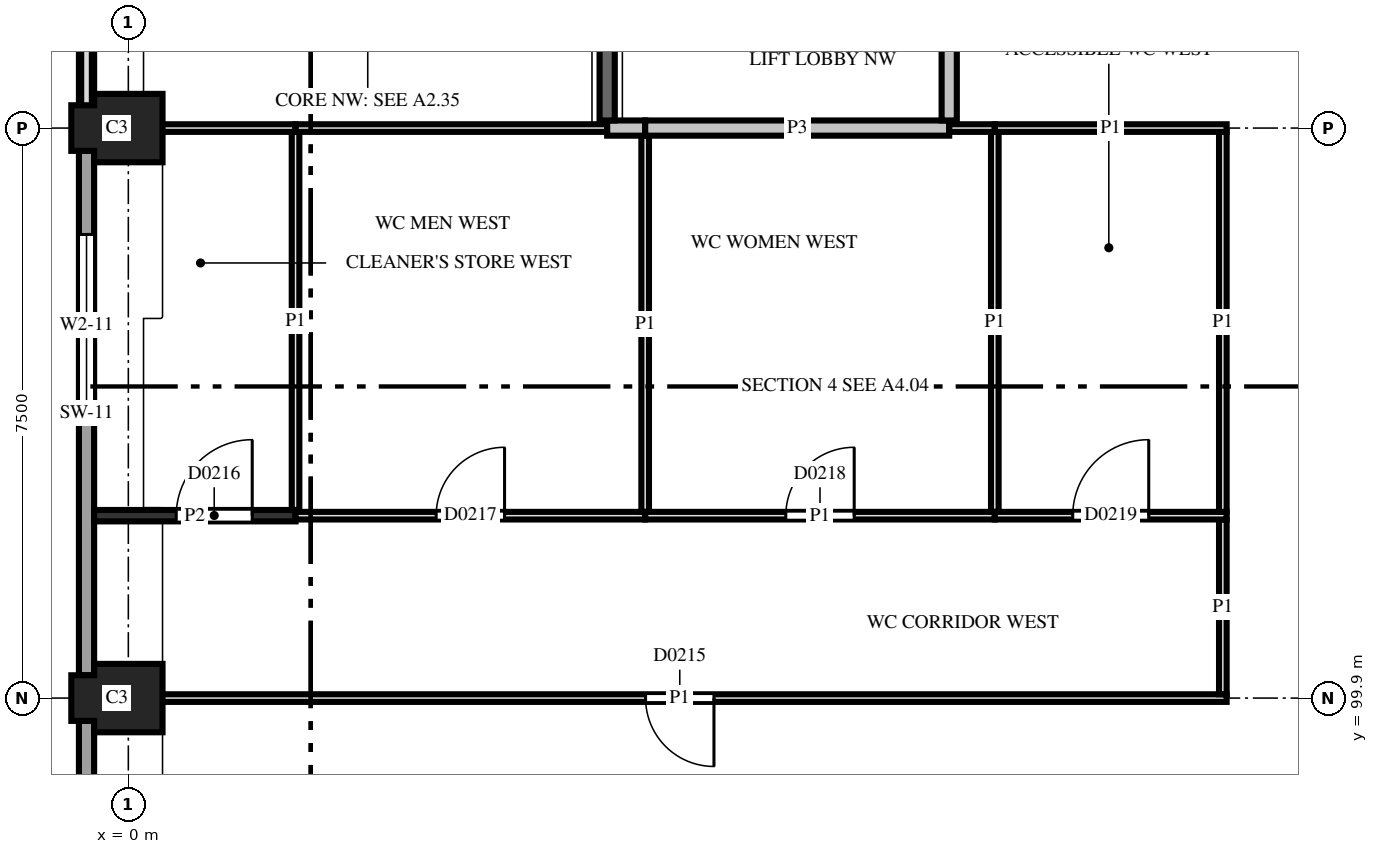
"""IFC4 building model, lengths in metres.
Left out: names, types, materials, properties, quantities, classifications, styles, units other than length and angle.
Written with IfcOpenShell. Run it as: python <this file> out.ifc"""

import sys

from ifc_helpers import new_model, si_unit, direction, frame, frame_2d, origin, place, context, subcontext, project, spatial, polyline, rectangle, outline, extrude, element, fill, save


model = new_model("IFC4")
c1 = context("Model", 3, precision=1e-05, world=origin(), true_north=direction((0.0, 1.0)))
c2 = subcontext(c1, "Body", "Model", "MODEL_VIEW")
j1 = project(units=[si_unit("LENGTHUNIT", "METRE"), si_unit("PLANEANGLEUNIT", "RADIAN")], contexts=[c1])
p1 = place(None, origin())
s1 = spatial("IfcSite", under=j1, at=p1, CompositionType="ELEMENT")
p2 = place(p1, origin())
s2 = spatial("IfcBuilding", under=s1, at=p2, CompositionType="ELEMENT")
p3 = place(p2, frame((0.0, 0.0, 8.2)))
s3 = spatial("IfcBuildingStorey", under=s2, at=p3, CompositionType="ELEMENT", Elevation=8.2)
for number, where, z_axis, x_axis in (
    (1, (0.0, 99.9, 0.0), (0.0, 0.0, 1.0), (-1.0, 0.0, 0.0)),
    (2, (0.0, 107.4, 0.0), (0.0, 0.0, 1.0), (-1.0, 0.0, 0.0)),
):
    element("IfcColumn", number, at=place(p3, frame(where, z_axis=z_axis, x_axis=x_axis)), inside=s3, PredefinedType="COLUMN", context=c2, shape_type="SweptSolid", body=[
        extrude(outline(polyline([(-0.45, -0.45), (0.45, -0.45), (0.45, -0.3), (0.75, -0.3), (0.75, 0.3), (0.45, 0.3), (0.45, 0.45), (-0.45, 0.45), (-0.45, -0.45)])), origin(), (0.0, 0.0, 1.0), 3.7),
    ])
p4 = place(p3, frame((-0.55, 114.6, 0.0), z_axis=(0.0, 0.0, 1.0), x_axis=(0.0, -1.0, 0.0)))
e3 = element("IfcWall", 3, at=p4, inside=s3, PredefinedType="SOLIDWALL", context=c2, shape_type="SweptSolid", body=[
    extrude(rectangle(XDim=6.9, YDim=0.2, at=frame_2d((3.45, 0.0))), origin(), (0.0, 0.0, 1.0), 2.3),
])
p5 = place(p3, frame((-0.55, 107.1, 0.0), z_axis=(0.0, 0.0, 1.0), x_axis=(0.0, -1.0, 0.0)))
e4 = element("IfcWall", 4, at=p5, inside=s3, PredefinedType="SOLIDWALL", context=c2, shape_type="SweptSolid", body=[
    extrude(rectangle(XDim=6.9, YDim=0.2, at=frame_2d((3.45, 0.0))), origin(), (0.0, 0.0, 1.0), 2.3),
])
p6 = place(p5, frame((1.1, 0.0, 0.55)))
e5 = element("IfcOpeningElement", 5, at=p6, cuts=e4, PredefinedType="OPENING", context=c2, shape_type="SweptSolid", body=[
    extrude(rectangle(XDim=2.4, YDim=1.0, at=frame_2d((1.2, 0.5))), frame((0.0, 0.11, 0.0), z_axis=(0.0, -1.0, 0.0), x_axis=(1.0, 0.0, 0.0)), (0.0, 0.0, 1.0), 0.22),
])
p7 = place(p3, frame((-0.55, 99.6, 0.0), z_axis=(0.0, 0.0, 1.0), x_axis=(0.0, -1.0, 0.0)))
e6 = element("IfcWall", 6, at=p7, inside=s3, PredefinedType="SOLIDWALL", context=c2, shape_type="SweptSolid", body=[
    extrude(rectangle(XDim=6.9, YDim=0.2, at=frame_2d((3.45, 0.0))), origin(), (0.0, 0.0, 1.0), 2.3),
])
p8 = place(p7, frame((2.25, 0.0, 0.55)))
e7 = element("IfcOpeningElement", 7, at=p8, cuts=e6, PredefinedType="OPENING", context=c2, shape_type="SweptSolid", body=[
    extrude(rectangle(XDim=2.4, YDim=1.0, at=frame_2d((1.2, 0.5))), frame((0.0, 0.11, 0.0), z_axis=(0.0, -1.0, 0.0), x_axis=(1.0, 0.0, 0.0)), (0.0, 0.0, 1.0), 0.22),
])
p9 = place(p3, frame((0.06, 99.9, 0.0), z_axis=(0.0, 0.0, 1.0), x_axis=(1.0, 0.0, 0.0)))
e8 = element("IfcWall", 8, at=p9, inside=s3, PredefinedType="PARTITIONING", context=c2, shape_type="SweptSolid", body=[
    extrude(rectangle(XDim=14.39, YDim=0.1, at=frame_2d((7.195, 0.0))), origin(), (0.0, 0.0, 1.0), 2.88),
])
p10 = place(p9, frame((6.745, 0.0, 0.0)))
e9 = element("IfcOpeningElement", 9, at=p10, cuts=e8, PredefinedType="OPENING", context=c2, shape_type="SweptSolid", body=[
    extrude(rectangle(XDim=0.9, YDim=2.1, at=frame_2d((0.45, 1.05))), frame((0.0, 0.06, 0.0), z_axis=(0.0, -1.0, 0.0), x_axis=(1.0, 0.0, 0.0)), (0.0, 0.0, 1.0), 0.12),
])
p11 = place(p3, frame((14.4, 99.95, 0.0), z_axis=(0.0, 0.0, 1.0), x_axis=(0.0, 1.0, 0.0)))
e10 = element("IfcWall", 10, at=p11, inside=s3, PredefinedType="PARTITIONING", context=c2, shape_type="SweptSolid", body=[
    extrude(rectangle(XDim=2.3, YDim=0.1, at=frame_2d((1.15, 0.0))), origin(), (0.0, 0.0, 1.0), 2.88),
])
p12 = place(p3, frame((2.2, 102.3, 0.0), z_axis=(0.0, 0.0, 1.0), x_axis=(-1.0, 0.0, 0.0)))
e11 = element("IfcWall", 11, at=p12, inside=s3, PredefinedType="PARTITIONING", context=c2, shape_type="SweptSolid", body=[
    extrude(rectangle(XDim=2.65, YDim=0.15, at=frame_2d((1.325, 0.0))), origin(), (0.0, 0.0, 1.0), 2.88),
])
p13 = place(p12, frame((0.57, 0.0, 0.0)))
e12 = element("IfcOpeningElement", 12, at=p13, cuts=e11, PredefinedType="OPENING", context=c2, shape_type="SweptSolid", body=[
    extrude(rectangle(XDim=1.0, YDim=2.1, at=frame_2d((0.5, 1.05))), frame((0.0, 0.085, 0.0), z_axis=(0.0, -1.0, 0.0), x_axis=(1.0, 0.0, 0.0)), (0.0, 0.0, 1.0), 0.17),
])
p14 = place(p3, frame((2.2, 102.375, 0.0), z_axis=(0.0, 0.0, 1.0), x_axis=(0.0, 1.0, 0.0)))
e13 = element("IfcWall", 13, at=p14, inside=s3, PredefinedType="PARTITIONING", context=c2, shape_type="SweptSolid", body=[
    extrude(rectangle(XDim=4.975, YDim=0.1, at=frame_2d((2.488, 0.0))), origin(), (0.0, 0.0, 1.0), 2.88),
])
p15 = place(p3, frame((6.8, 102.3, 0.0), z_axis=(0.0, 0.0, 1.0), x_axis=(-1.0, 0.0, 0.0)))
e14 = element("IfcWall", 14, at=p15, inside=s3, PredefinedType="PARTITIONING", context=c2, shape_type="SweptSolid", body=[
    extrude(rectangle(XDim=4.6, YDim=0.1, at=frame_2d((2.3, 0.0))), origin(), (0.0, 0.0, 1.0), 2.88),
])
p16 = place(p15, frame((1.85, 0.0, 0.0)))
e15 = element("IfcOpeningElement", 15, at=p16, cuts=e14, PredefinedType="OPENING", context=c2, shape_type="SweptSolid", body=[
    extrude(rectangle(XDim=0.9, YDim=2.1, at=frame_2d((0.45, 1.05))), frame((0.0, 0.06, 0.0), z_axis=(0.0, -1.0, 0.0), x_axis=(1.0, 0.0, 0.0)), (0.0, 0.0, 1.0), 0.12),
])
p17 = place(p3, frame((6.8, 102.35, 0.0), z_axis=(0.0, 0.0, 1.0), x_axis=(0.0, 1.0, 0.0)))
e16 = element("IfcWall", 16, at=p17, inside=s3, PredefinedType="PARTITIONING", context=c2, shape_type="SweptSolid", body=[
    extrude(rectangle(XDim=4.95, YDim=0.1, at=frame_2d((2.475, 0.0))), origin(), (0.0, 0.0, 1.0), 2.88),
])
p18 = place(p3, frame((11.4, 102.3, 0.0), z_axis=(0.0, 0.0, 1.0), x_axis=(-1.0, 0.0, 0.0)))
e17 = element("IfcWall", 17, at=p18, inside=s3, PredefinedType="PARTITIONING", context=c2, shape_type="SweptSolid", body=[
    extrude(rectangle(XDim=4.6, YDim=0.1, at=frame_2d((2.3, 0.0))), origin(), (0.0, 0.0, 1.0), 2.88),
])
p19 = place(p18, frame((1.85, 0.0, 0.0)))
e18 = element("IfcOpeningElement", 18, at=p19, cuts=e17, PredefinedType="OPENING", context=c2, shape_type="SweptSolid", body=[
    extrude(rectangle(XDim=0.9, YDim=2.1, at=frame_2d((0.45, 1.05))), frame((0.0, 0.06, 0.0), z_axis=(0.0, -1.0, 0.0), x_axis=(1.0, 0.0, 0.0)), (0.0, 0.0, 1.0), 0.12),
])
p20 = place(p3, frame((11.4, 102.35, 0.0), z_axis=(0.0, 0.0, 1.0), x_axis=(0.0, 1.0, 0.0)))
e19 = element("IfcWall", 19, at=p20, inside=s3, PredefinedType="PARTITIONING", context=c2, shape_type="SweptSolid", body=[
    extrude(rectangle(XDim=5.0, YDim=0.1, at=frame_2d((2.5, 0.0))), origin(), (0.0, 0.0, 1.0), 2.88),
])
p21 = place(p3, frame((14.45, 102.3, 0.0), z_axis=(0.0, 0.0, 1.0), x_axis=(-1.0, 0.0, 0.0)))
e20 = element("IfcWall", 20, at=p21, inside=s3, PredefinedType="PARTITIONING", context=c2, shape_type="SweptSolid", body=[
    extrude(rectangle(XDim=3.05, YDim=0.1, at=frame_2d((1.525, 0.0))), origin(), (0.0, 0.0, 1.0), 2.88),
])
p22 = place(p21, frame((1.025, 0.0, 0.0)))
e21 = element("IfcOpeningElement", 21, at=p22, cuts=e20, PredefinedType="OPENING", context=c2, shape_type="SweptSolid", body=[
    extrude(rectangle(XDim=1.0, YDim=2.1, at=frame_2d((0.5, 1.05))), frame((0.0, 0.06, 0.0), z_axis=(0.0, -1.0, 0.0), x_axis=(1.0, 0.0, 0.0)), (0.0, 0.0, 1.0), 0.12),
])
p23 = place(p3, frame((14.4, 102.35, 0.0), z_axis=(0.0, 0.0, 1.0), x_axis=(0.0, 1.0, 0.0)))
e22 = element("IfcWall", 22, at=p23, inside=s3, PredefinedType="PARTITIONING", context=c2, shape_type="SweptSolid", body=[
    extrude(rectangle(XDim=5.0, YDim=0.1, at=frame_2d((2.5, 0.0))), origin(), (0.0, 0.0, 1.0), 2.88),
])
p24 = place(p3, frame((2.2, 107.4, 0.0), z_axis=(0.0, 0.0, 1.0), x_axis=(-1.0, 0.0, 0.0)))
e23 = element("IfcWall", 23, at=p24, inside=s3, PredefinedType="PARTITIONING", context=c2, shape_type="SweptSolid", body=[
    extrude(rectangle(XDim=2.14, YDim=0.1, at=frame_2d((1.07, 0.0))), origin(), (0.0, 0.0, 1.0), 2.88),
])
p25 = place(p3, frame((6.3, 107.4, 0.0), z_axis=(0.0, 0.0, 1.0), x_axis=(-1.0, 0.0, 0.0)))
e24 = element("IfcWall", 24, at=p25, inside=s3, PredefinedType="PARTITIONING", context=c2, shape_type="SweptSolid", body=[
    extrude(rectangle(XDim=4.1, YDim=0.1, at=frame_2d((2.05, 0.0))), origin(), (0.0, 0.0, 1.0), 2.88),
])
p26 = place(p3, frame((6.3, 107.4, 0.0), z_axis=(0.0, 0.0, 1.0), x_axis=(1.0, 0.0, 0.0)))
e25 = element("IfcWall", 25, at=p26, inside=s3, PredefinedType="PARTITIONING", context=c2, shape_type="SweptSolid", body=[
    extrude(rectangle(XDim=0.5, YDim=0.2, at=frame_2d((0.25, 0.0))), origin(), (0.0, 0.0, 1.0), 2.88),
])
p27 = place(p3, frame((6.8, 107.4, 0.0), z_axis=(0.0, 0.0, 1.0), x_axis=(1.0, 0.0, 0.0)))
e26 = element("IfcWall", 26, at=p27, inside=s3, PredefinedType="PARTITIONING", context=c2, shape_type="SweptSolid", body=[
    extrude(rectangle(XDim=4.0, YDim=0.2, at=frame_2d((2.0, 0.0))), origin(), (0.0, 0.0, 1.0), 2.88),
])
p28 = place(p3, frame((10.8, 107.5, 0.0), z_axis=(0.0, 0.0, 1.0), x_axis=(0.0, 1.0, 0.0)))
e27 = element("IfcWall", 27, at=p28, inside=s3, PredefinedType="PARTITIONING", context=c2, shape_type="SweptSolid", body=[
    extrude(rectangle(XDim=7.85, YDim=0.2, at=frame_2d((3.925, 0.0))), origin(), (0.0, 0.0, 1.0), 2.88),
])
p29 = place(p28, frame((3.17, 0.0, 0.0)))
e28 = element("IfcOpeningElement", 28, at=p29, cuts=e27, PredefinedType="OPENING", context=c2, shape_type="SweptSolid", body=[
    extrude(rectangle(XDim=1.0, YDim=2.1, at=frame_2d((0.5, 1.05))), frame((0.0, 0.11, 0.0), z_axis=(0.0, -1.0, 0.0), x_axis=(1.0, 0.0, 0.0)), (0.0, 0.0, 1.0), 0.22),
])
p30 = place(p3, frame((11.4, 107.4, 0.0), z_axis=(0.0, 0.0, 1.0), x_axis=(-1.0, 0.0, 0.0)))
e29 = element("IfcWall", 29, at=p30, inside=s3, PredefinedType="PARTITIONING", context=c2, shape_type="SweptSolid", body=[
    extrude(rectangle(XDim=0.6, YDim=0.1, at=frame_2d((0.3, 0.0))), origin(), (0.0, 0.0, 1.0), 2.88),
])
p31 = place(p3, frame((14.45, 107.4, 0.0), z_axis=(0.0, 0.0, 1.0), x_axis=(-1.0, 0.0, 0.0)))
e30 = element("IfcWall", 30, at=p31, inside=s3, PredefinedType="PARTITIONING", context=c2, shape_type="SweptSolid", body=[
    extrude(rectangle(XDim=3.05, YDim=0.1, at=frame_2d((1.525, 0.0))), origin(), (0.0, 0.0, 1.0), 2.88),
])
p32 = place(p3, frame((6.3, 111.225, 0.0), z_axis=(0.0, 0.0, 1.0), x_axis=(0.0, -1.0, 0.0)))
e31 = element("IfcWall", 31, at=p32, inside=s3, PredefinedType="PARTITIONING", context=c2, shape_type="SweptSolid", body=[
    extrude(rectangle(XDim=3.725, YDim=0.2, at=frame_2d((1.863, 0.0))), origin(), (0.0, 0.0, 1.0), 2.88),
])
p33 = place(p32, frame((1.363, 0.0, 0.0)))
e32 = element("IfcOpeningElement", 32, at=p33, cuts=e31, PredefinedType="OPENING", context=c2, shape_type="SweptSolid", body=[
    extrude(rectangle(XDim=1.0, YDim=2.1, at=frame_2d((0.5, 1.05))), frame((0.0, 0.11, 0.0), z_axis=(0.0, -1.0, 0.0), x_axis=(1.0, 0.0, 0.0)), (0.0, 0.0, 1.0), 0.22),
])
p34 = place(p6, origin())
e33 = element("IfcWindow", 33, at=p34, inside=s3, PartitioningType="SINGLE_PANEL", PredefinedType="WINDOW", context=c2, shape_type="SweptSolid", body=[
    extrude(rectangle(XDim=2.4, YDim=1.0, at=frame_2d((1.2, 0.5))), frame((0.0, 0.03, 0.0), z_axis=(0.0, -1.0, 0.0), x_axis=(1.0, 0.0, 0.0)), (0.0, 0.0, 1.0), 0.06),
])
fill(e5, e33)
p35 = place(p10, origin())
e34 = element("IfcDoor", 34, at=p35, inside=s3, OperationType="SINGLE_SWING_RIGHT", PredefinedType="DOOR", context=c2, shape_type="SweptSolid", body=[
    extrude(rectangle(XDim=0.9, YDim=2.1, at=frame_2d((0.45, 1.05))), frame((0.0, 0.025, 0.0), z_axis=(0.0, -1.0, 0.0), x_axis=(1.0, 0.0, 0.0)), (0.0, 0.0, 1.0), 0.05),
])
fill(e9, e34)
p36 = place(p13, origin())
e35 = element("IfcDoor", 35, at=p36, inside=s3, OperationType="SINGLE_SWING_LEFT", PredefinedType="DOOR", context=c2, shape_type="SweptSolid", body=[
    extrude(rectangle(XDim=1.0, YDim=2.1, at=frame_2d((0.5, 1.05))), frame((0.0, 0.025, 0.0), z_axis=(0.0, -1.0, 0.0), x_axis=(1.0, 0.0, 0.0)), (0.0, 0.0, 1.0), 0.05),
])
fill(e12, e35)
p37 = place(p16, origin())
e36 = element("IfcDoor", 36, at=p37, inside=s3, OperationType="SINGLE_SWING_LEFT", PredefinedType="DOOR", context=c2, shape_type="SweptSolid", body=[
    extrude(rectangle(XDim=0.9, YDim=2.1, at=frame_2d((0.45, 1.05))), frame((0.0, 0.025, 0.0), z_axis=(0.0, -1.0, 0.0), x_axis=(1.0, 0.0, 0.0)), (0.0, 0.0, 1.0), 0.05),
])
fill(e15, e36)
p38 = place(p19, origin())
e37 = element("IfcDoor", 37, at=p38, inside=s3, OperationType="SINGLE_SWING_LEFT", PredefinedType="DOOR", context=c2, shape_type="SweptSolid", body=[
    extrude(rectangle(XDim=0.9, YDim=2.1, at=frame_2d((0.45, 1.05))), frame((0.0, 0.025, 0.0), z_axis=(0.0, -1.0, 0.0), x_axis=(1.0, 0.0, 0.0)), (0.0, 0.0, 1.0), 0.05),
])
fill(e18, e37)
p39 = place(p22, origin())
e38 = element("IfcDoor", 38, at=p39, inside=s3, OperationType="SINGLE_SWING_LEFT", PredefinedType="DOOR", context=c2, shape_type="SweptSolid", body=[
    extrude(rectangle(XDim=1.0, YDim=2.1, at=frame_2d((0.5, 1.05))), frame((0.0, 0.025, 0.0), z_axis=(0.0, -1.0, 0.0), x_axis=(1.0, 0.0, 0.0)), (0.0, 0.0, 1.0), 0.05),
])
fill(e21, e38)
save(model, sys.argv[1])
